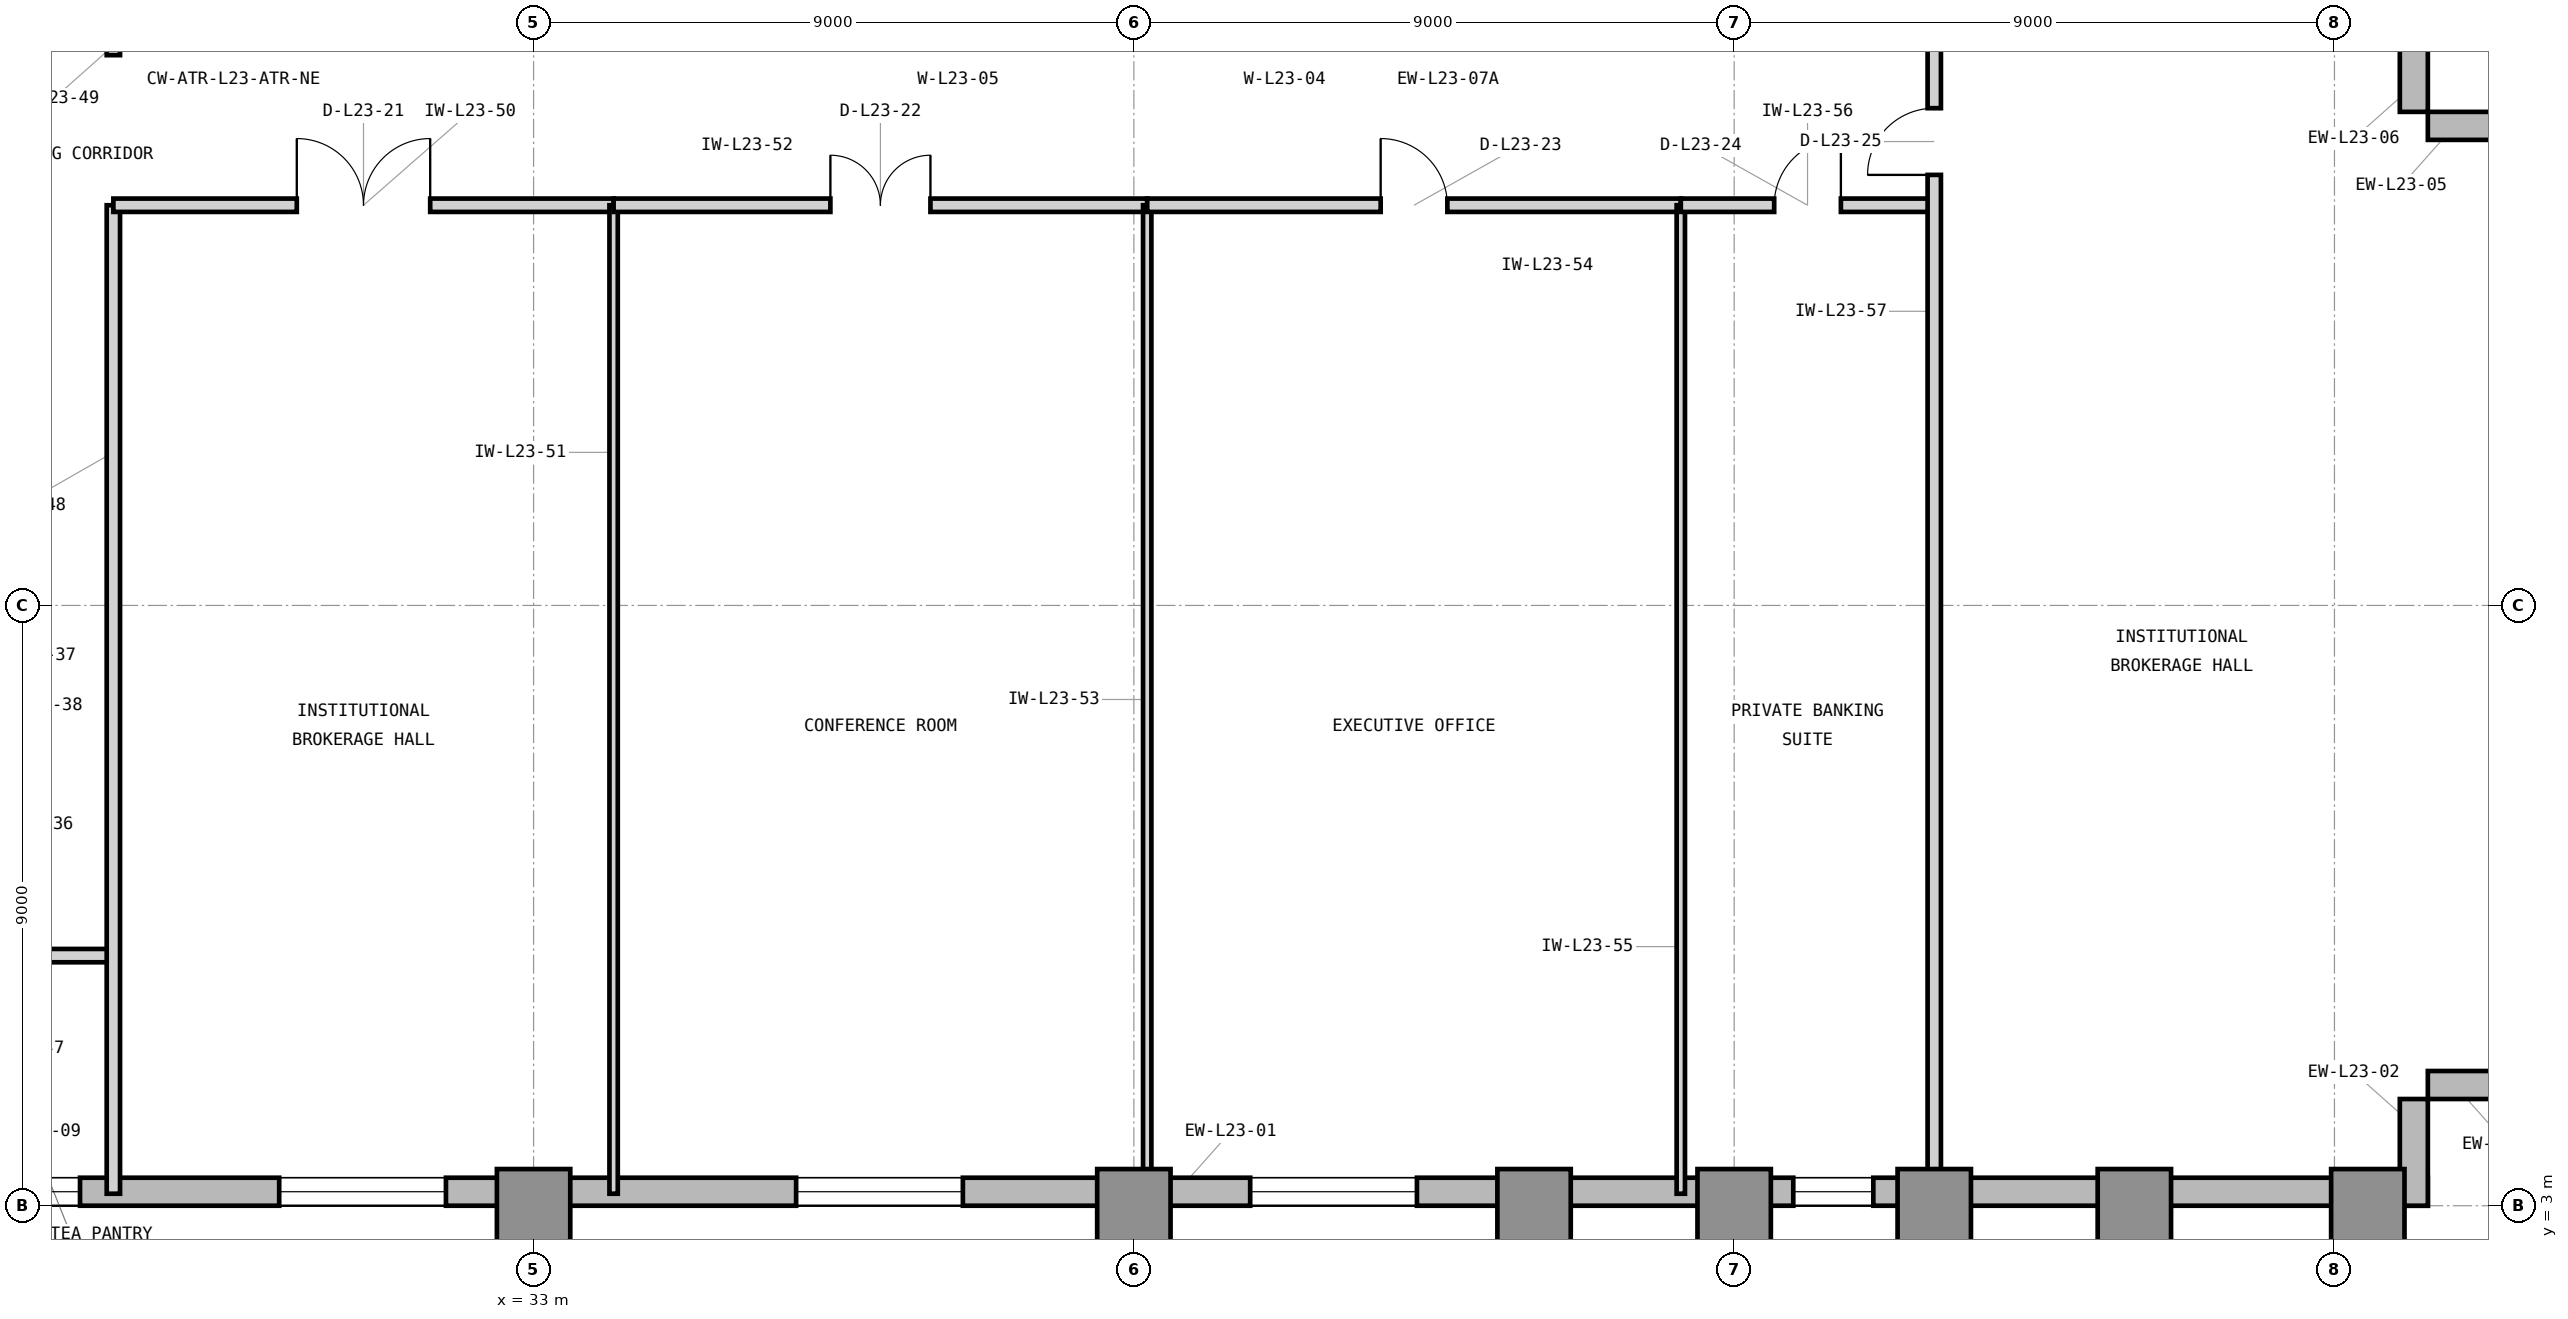
"""IFC4 building model, lengths in metres.
Left out: names, types, materials, properties, quantities, classifications, styles, units other than length and angle.
Written with IfcOpenShell. Run it as: python <this file> out.ifc"""

import sys

from ifc_helpers import new_model, si_unit, direction, frame, frame_2d, origin, origin_2d, place, context, subcontext, project, spatial, rectangle, extrude, element, fill, save


model = new_model("IFC4")
c1 = context("Model", 3, precision=1e-05, world=origin(), true_north=direction((0.0, 1.0)))
c2 = subcontext(c1, "Body", "Model", "MODEL_VIEW")
j1 = project(units=[si_unit("LENGTHUNIT", "METRE"), si_unit("PLANEANGLEUNIT", "RADIAN")], contexts=[c1])
p1 = place(None, origin())
s1 = spatial("IfcSite", under=j1, at=p1, CompositionType="ELEMENT")
p2 = place(p1, origin())
s2 = spatial("IfcBuilding", under=s1, at=p2, CompositionType="ELEMENT")
p3 = place(p2, frame((0.0, 0.0, 101.1)))
s3 = spatial("IfcBuildingStorey", under=s2, at=p3, CompositionType="ELEMENT", Elevation=101.1)
for number, where, z_axis, x_axis in (
    (1, (33.0, 3.0, 0.0), (0.0, 0.0, 1.0), (1.0, 0.0, 0.0)),
    (2, (42.0, 3.0, 0.0), (0.0, 0.0, 1.0), (1.0, 0.0, 0.0)),
    (3, (48.0, 3.0, 0.0), (0.0, 0.0, 1.0), (1.0, 0.0, 0.0)),
    (4, (51.0, 3.0, 0.0), (0.0, 0.0, 1.0), (1.0, 0.0, 0.0)),
    (5, (54.0, 3.0, 0.0), (0.0, 0.0, 1.0), (1.0, 0.0, 0.0)),
    (6, (57.0, 3.0, 0.0), (0.0, 0.0, 1.0), (1.0, 0.0, 0.0)),
    (7, (60.5, 3.0, 0.0), (0.0, 0.0, 1.0), (1.0, 0.0, 0.0)),
):
    element("IfcColumn", number, at=place(p3, frame(where, z_axis=z_axis, x_axis=x_axis)), inside=s3, PredefinedType="COLUMN", context=c2, shape_type="SweptSolid", body=[
        extrude(rectangle(XDim=1.1, YDim=1.1, at=origin_2d()), origin(), (0.0, 0.0, 1.0), 3.9),
    ])
p4 = place(p3, frame((23.9, 3.21, 0.0), z_axis=(0.0, 0.0, 1.0), x_axis=(1.0, 0.0, 0.0)))
e8 = element("IfcWall", 8, at=p4, inside=s3, PredefinedType="STANDARD", context=c2, shape_type="SweptSolid", body=[
    extrude(rectangle(XDim=37.5, YDim=0.42, at=frame_2d((18.75, 0.0))), origin(), (0.0, 0.0, 1.0), 3.7),
])
p5 = place(p4, frame((19.844, 0.0, 0.85)))
e9 = element("IfcOpeningElement", 9, at=p5, cuts=e8, PredefinedType="OPENING", context=c2, shape_type="SweptSolid", body=[
    extrude(rectangle(XDim=2.5, YDim=2.25, at=frame_2d((1.25, 1.125))), frame((0.0, 0.22, 0.0), z_axis=(0.0, -1.0, 0.0), x_axis=(1.0, 0.0, 0.0)), (0.0, 0.0, 1.0), 0.44),
])
p6 = place(p4, frame((1.1, 0.0, 0.85)))
e10 = element("IfcOpeningElement", 10, at=p6, cuts=e8, PredefinedType="OPENING", context=c2, shape_type="SweptSolid", body=[
    extrude(rectangle(XDim=1.2, YDim=2.25, at=frame_2d((0.6, 1.125))), frame((0.0, 0.22, 0.0), z_axis=(0.0, -1.0, 0.0), x_axis=(1.0, 0.0, 0.0)), (0.0, 0.0, 1.0), 0.44),
])
p7 = place(p4, frame((5.286, 0.0, 0.85)))
e11 = element("IfcOpeningElement", 11, at=p7, cuts=e8, PredefinedType="OPENING", context=c2, shape_type="SweptSolid", body=[
    extrude(rectangle(XDim=2.5, YDim=2.25, at=frame_2d((1.25, 1.125))), frame((0.0, 0.22, 0.0), z_axis=(0.0, -1.0, 0.0), x_axis=(1.0, 0.0, 0.0)), (0.0, 0.0, 1.0), 0.44),
])
p8 = place(p4, frame((13.036, 0.0, 0.85)))
e12 = element("IfcOpeningElement", 12, at=p8, cuts=e8, PredefinedType="OPENING", context=c2, shape_type="SweptSolid", body=[
    extrude(rectangle(XDim=2.5, YDim=2.25, at=frame_2d((1.25, 1.125))), frame((0.0, 0.22, 0.0), z_axis=(0.0, -1.0, 0.0), x_axis=(1.0, 0.0, 0.0)), (0.0, 0.0, 1.0), 0.44),
])
p9 = place(p4, frame((27.986, 0.0, 0.85)))
e13 = element("IfcOpeningElement", 13, at=p9, cuts=e8, PredefinedType="OPENING", context=c2, shape_type="SweptSolid", body=[
    extrude(rectangle(XDim=1.2, YDim=2.25, at=frame_2d((0.6, 1.125))), frame((0.0, 0.22, 0.0), z_axis=(0.0, -1.0, 0.0), x_axis=(1.0, 0.0, 0.0)), (0.0, 0.0, 1.0), 0.44),
])
for number, where, z_axis, x_axis in (
    (14, (61.19, 3.0, 0.0), (0.0, 0.0, 1.0), (0.0, 1.0, 0.0)),
    (15, (61.4, 4.81, 0.0), (0.0, 0.0, 1.0), (1.0, 0.0, 0.0)),
    (16, (63.0, 19.19, 0.0), (0.0, 0.0, 1.0), (-1.0, 0.0, 0.0)),
    (17, (61.19, 19.4, 0.0), (0.0, 0.0, 1.0), (0.0, 1.0, 0.0)),
):
    element("IfcWall", number, at=place(p3, frame(where, z_axis=z_axis, x_axis=x_axis)), inside=s3, PredefinedType="STANDARD", context=c2, shape_type="SweptSolid", body=[
        extrude(rectangle(XDim=1.6, YDim=0.42, at=frame_2d((0.8, 0.0))), origin(), (0.0, 0.0, 1.0), 3.7),
    ])
p10 = place(p3, frame((23.85, 6.75, 0.0), z_axis=(0.0, 0.0, 1.0), x_axis=(1.0, 0.0, 0.0)))
e18 = element("IfcWall", 18, at=p10, inside=s3, PredefinedType="PARTITIONING", context=c2, shape_type="SweptSolid", body=[
    extrude(rectangle(XDim=2.85, YDim=0.2, at=frame_2d((1.425, 0.0))), origin(), (0.0, 0.0, 1.0), 3.69),
])
p11 = place(p10, frame((0.7, 0.0, 0.0)))
e19 = element("IfcOpeningElement", 19, at=p11, cuts=e18, PredefinedType="OPENING", context=c2, shape_type="SweptSolid", body=[
    extrude(rectangle(XDim=1.0, YDim=2.15, at=frame_2d((0.5, 1.075))), frame((0.0, 0.11, 0.0), z_axis=(0.0, -1.0, 0.0), x_axis=(1.0, 0.0, 0.0)), (0.0, 0.0, 1.0), 0.22),
])
p12 = place(p3, frame((26.7, 3.18, 0.0), z_axis=(0.0, 0.0, 1.0), x_axis=(0.0, 1.0, 0.0)))
e20 = element("IfcWall", 20, at=p12, inside=s3, PredefinedType="PARTITIONING", context=c2, shape_type="SweptSolid", body=[
    extrude(rectangle(XDim=14.82, YDim=0.2, at=frame_2d((7.41, 0.0))), origin(), (0.0, 0.0, 1.0), 3.69),
])
p13 = place(p3, frame((26.7, 20.25, 0.0), z_axis=(0.0, 0.0, 1.0), x_axis=(0.0, 1.0, 0.0)))
e21 = element("IfcWall", 21, at=p13, inside=s3, PredefinedType="PARTITIONING", context=c2, shape_type="SweptSolid", body=[
    extrude(rectangle(XDim=0.57, YDim=0.2, at=frame_2d((0.285, 0.0))), origin(), (0.0, 0.0, 1.0), 3.69),
])
p14 = place(p3, frame((26.7, 18.0, 0.0), z_axis=(0.0, 0.0, 1.0), x_axis=(1.0, 0.0, 0.0)))
e22 = element("IfcWall", 22, at=p14, inside=s3, PredefinedType="PARTITIONING", context=c2, shape_type="SweptSolid", body=[
    extrude(rectangle(XDim=7.5, YDim=0.2, at=frame_2d((3.75, 0.0))), origin(), (0.0, 0.0, 1.0), 3.227),
])
p15 = place(p14, frame((2.75, 0.0, 0.0)))
e23 = element("IfcOpeningElement", 23, at=p15, cuts=e22, PredefinedType="OPENING", context=c2, shape_type="SweptSolid", body=[
    extrude(rectangle(XDim=2.0, YDim=2.5, at=frame_2d((1.0, 1.25))), frame((0.0, 0.11, 0.0), z_axis=(0.0, -1.0, 0.0), x_axis=(1.0, 0.0, 0.0)), (0.0, 0.0, 1.0), 0.22),
])
p16 = place(p3, frame((34.2, 3.18, 0.0), z_axis=(0.0, 0.0, 1.0), x_axis=(0.0, 1.0, 0.0)))
e24 = element("IfcWall", 24, at=p16, inside=s3, PredefinedType="PARTITIONING", context=c2, shape_type="SweptSolid", body=[
    extrude(rectangle(XDim=14.82, YDim=0.125, at=frame_2d((7.41, 0.0))), origin(), (0.0, 0.0, 1.0), 3.69),
])
p17 = place(p3, frame((34.2, 18.0, 0.0), z_axis=(0.0, 0.0, 1.0), x_axis=(1.0, 0.0, 0.0)))
e25 = element("IfcWall", 25, at=p17, inside=s3, PredefinedType="PARTITIONING", context=c2, shape_type="SweptSolid", body=[
    extrude(rectangle(XDim=8.0, YDim=0.2, at=frame_2d((4.0, 0.0))), origin(), (0.0, 0.0, 1.0), 3.227),
])
p18 = place(p17, frame((3.25, 0.0, 0.0)))
e26 = element("IfcOpeningElement", 26, at=p18, cuts=e25, PredefinedType="OPENING", context=c2, shape_type="SweptSolid", body=[
    extrude(rectangle(XDim=1.5, YDim=2.3, at=frame_2d((0.75, 1.15))), frame((0.0, 0.11, 0.0), z_axis=(0.0, -1.0, 0.0), x_axis=(1.0, 0.0, 0.0)), (0.0, 0.0, 1.0), 0.22),
])
p19 = place(p3, frame((42.2, 3.18, 0.0), z_axis=(0.0, 0.0, 1.0), x_axis=(0.0, 1.0, 0.0)))
e27 = element("IfcWall", 27, at=p19, inside=s3, PredefinedType="PARTITIONING", context=c2, shape_type="SweptSolid", body=[
    extrude(rectangle(XDim=14.82, YDim=0.125, at=frame_2d((7.41, 0.0))), origin(), (0.0, 0.0, 1.0), 3.69),
])
p20 = place(p3, frame((42.2, 18.0, 0.0), z_axis=(0.0, 0.0, 1.0), x_axis=(1.0, 0.0, 0.0)))
e28 = element("IfcWall", 28, at=p20, inside=s3, PredefinedType="PARTITIONING", context=c2, shape_type="SweptSolid", body=[
    extrude(rectangle(XDim=8.0, YDim=0.2, at=frame_2d((4.0, 0.0))), origin(), (0.0, 0.0, 1.0), 3.227),
])
p21 = place(p20, frame((3.5, 0.0, 0.0)))
e29 = element("IfcOpeningElement", 29, at=p21, cuts=e28, PredefinedType="OPENING", context=c2, shape_type="SweptSolid", body=[
    extrude(rectangle(XDim=1.0, YDim=2.15, at=frame_2d((0.5, 1.075))), frame((0.0, 0.11, 0.0), z_axis=(0.0, -1.0, 0.0), x_axis=(1.0, 0.0, 0.0)), (0.0, 0.0, 1.0), 0.22),
])
p22 = place(p3, frame((50.2, 3.18, 0.0), z_axis=(0.0, 0.0, 1.0), x_axis=(0.0, 1.0, 0.0)))
e30 = element("IfcWall", 30, at=p22, inside=s3, PredefinedType="PARTITIONING", context=c2, shape_type="SweptSolid", body=[
    extrude(rectangle(XDim=14.82, YDim=0.125, at=frame_2d((7.41, 0.0))), origin(), (0.0, 0.0, 1.0), 3.69),
])
p23 = place(p3, frame((50.2, 18.0, 0.0), z_axis=(0.0, 0.0, 1.0), x_axis=(1.0, 0.0, 0.0)))
e31 = element("IfcWall", 31, at=p23, inside=s3, PredefinedType="PARTITIONING", context=c2, shape_type="SweptSolid", body=[
    extrude(rectangle(XDim=3.8, YDim=0.2, at=frame_2d((1.9, 0.0))), origin(), (0.0, 0.0, 1.0), 3.227),
])
p24 = place(p23, frame((1.4, 0.0, 0.0)))
e32 = element("IfcOpeningElement", 32, at=p24, cuts=e31, PredefinedType="OPENING", context=c2, shape_type="SweptSolid", body=[
    extrude(rectangle(XDim=1.0, YDim=2.15, at=frame_2d((0.5, 1.075))), frame((0.0, 0.11, 0.0), z_axis=(0.0, -1.0, 0.0), x_axis=(1.0, 0.0, 0.0)), (0.0, 0.0, 1.0), 0.22),
])
p25 = place(p3, frame((54.0, 3.18, 0.0), z_axis=(0.0, 0.0, 1.0), x_axis=(0.0, 1.0, 0.0)))
e33 = element("IfcWall", 33, at=p25, inside=s3, PredefinedType="PARTITIONING", context=c2, shape_type="SweptSolid", body=[
    extrude(rectangle(XDim=17.64, YDim=0.2, at=frame_2d((8.82, 0.0))), origin(), (0.0, 0.0, 1.0), 2.917),
])
p26 = place(p25, frame((15.275, 0.0, 0.0)))
e34 = element("IfcOpeningElement", 34, at=p26, cuts=e33, PredefinedType="OPENING", context=c2, shape_type="SweptSolid", body=[
    extrude(rectangle(XDim=1.0, YDim=2.15, at=frame_2d((0.5, 1.075))), frame((0.0, 0.11, 0.0), z_axis=(0.0, -1.0, 0.0), x_axis=(1.0, 0.0, 0.0)), (0.0, 0.0, 1.0), 0.22),
])
p27 = place(p5, origin())
e35 = element("IfcWindow", 35, at=p27, inside=s3, PartitioningType="SINGLE_PANEL", PredefinedType="WINDOW", context=c2, shape_type="SweptSolid", body=[
    extrude(rectangle(XDim=2.5, YDim=2.25, at=frame_2d((1.25, 1.125))), frame((0.0, 0.11, 0.0), z_axis=(0.0, -1.0, 0.0), x_axis=(1.0, 0.0, 0.0)), (0.0, 0.0, 1.0), 0.06),
])
fill(e9, e35)
p28 = place(p15, origin())
e36 = element("IfcDoor", 36, at=p28, inside=s3, OperationType="DOUBLE_DOOR_SINGLE_SWING", PredefinedType="DOOR", context=c2, shape_type="SweptSolid", body=[
    extrude(rectangle(XDim=2.0, YDim=2.5, at=frame_2d((1.0, 1.25))), frame((0.0, 0.025, 0.0), z_axis=(0.0, -1.0, 0.0), x_axis=(1.0, 0.0, 0.0)), (0.0, 0.0, 1.0), 0.05),
])
fill(e23, e36)
p29 = place(p18, origin())
e37 = element("IfcDoor", 37, at=p29, inside=s3, OperationType="DOUBLE_DOOR_SINGLE_SWING", PredefinedType="DOOR", context=c2, shape_type="SweptSolid", body=[
    extrude(rectangle(XDim=1.5, YDim=2.3, at=frame_2d((0.75, 1.15))), frame((0.0, 0.025, 0.0), z_axis=(0.0, -1.0, 0.0), x_axis=(1.0, 0.0, 0.0)), (0.0, 0.0, 1.0), 0.05),
])
fill(e26, e37)
p30 = place(p21, origin())
e38 = element("IfcDoor", 38, at=p30, inside=s3, OperationType="SINGLE_SWING_LEFT", PredefinedType="DOOR", context=c2, shape_type="SweptSolid", body=[
    extrude(rectangle(XDim=1.0, YDim=2.15, at=frame_2d((0.5, 1.075))), frame((0.0, 0.025, 0.0), z_axis=(0.0, -1.0, 0.0), x_axis=(1.0, 0.0, 0.0)), (0.0, 0.0, 1.0), 0.05),
])
fill(e29, e38)
p31 = place(p24, origin())
e39 = element("IfcDoor", 39, at=p31, inside=s3, OperationType="SINGLE_SWING_RIGHT", PredefinedType="DOOR", context=c2, shape_type="SweptSolid", body=[
    extrude(rectangle(XDim=1.0, YDim=2.15, at=frame_2d((0.5, 1.075))), frame((0.0, 0.025, 0.0), z_axis=(0.0, -1.0, 0.0), x_axis=(1.0, 0.0, 0.0)), (0.0, 0.0, 1.0), 0.05),
])
fill(e32, e39)
p32 = place(p26, origin())
e40 = element("IfcDoor", 40, at=p32, inside=s3, OperationType="SINGLE_SWING_LEFT", PredefinedType="DOOR", context=c2, shape_type="SweptSolid", body=[
    extrude(rectangle(XDim=1.0, YDim=2.15, at=frame_2d((0.5, 1.075))), frame((0.0, 0.025, 0.0), z_axis=(0.0, -1.0, 0.0), x_axis=(1.0, 0.0, 0.0)), (0.0, 0.0, 1.0), 0.05),
])
fill(e34, e40)
p33 = place(p6, origin())
e41 = element("IfcWindow", 41, at=p33, inside=s3, PartitioningType="SINGLE_PANEL", PredefinedType="WINDOW", context=c2, shape_type="SweptSolid", body=[
    extrude(rectangle(XDim=1.2, YDim=2.25, at=frame_2d((0.6, 1.125))), frame((0.0, 0.11, 0.0), z_axis=(0.0, -1.0, 0.0), x_axis=(1.0, 0.0, 0.0)), (0.0, 0.0, 1.0), 0.06),
])
fill(e10, e41)
p34 = place(p7, origin())
e42 = element("IfcWindow", 42, at=p34, inside=s3, PartitioningType="SINGLE_PANEL", PredefinedType="WINDOW", context=c2, shape_type="SweptSolid", body=[
    extrude(rectangle(XDim=2.5, YDim=2.25, at=frame_2d((1.25, 1.125))), frame((0.0, 0.11, 0.0), z_axis=(0.0, -1.0, 0.0), x_axis=(1.0, 0.0, 0.0)), (0.0, 0.0, 1.0), 0.06),
])
fill(e11, e42)
p35 = place(p8, origin())
e43 = element("IfcWindow", 43, at=p35, inside=s3, PartitioningType="SINGLE_PANEL", PredefinedType="WINDOW", context=c2, shape_type="SweptSolid", body=[
    extrude(rectangle(XDim=2.5, YDim=2.25, at=frame_2d((1.25, 1.125))), frame((0.0, 0.11, 0.0), z_axis=(0.0, -1.0, 0.0), x_axis=(1.0, 0.0, 0.0)), (0.0, 0.0, 1.0), 0.06),
])
fill(e12, e43)
p36 = place(p9, origin())
e44 = element("IfcWindow", 44, at=p36, inside=s3, PartitioningType="SINGLE_PANEL", PredefinedType="WINDOW", context=c2, shape_type="SweptSolid", body=[
    extrude(rectangle(XDim=1.2, YDim=2.25, at=frame_2d((0.6, 1.125))), frame((0.0, 0.11, 0.0), z_axis=(0.0, -1.0, 0.0), x_axis=(1.0, 0.0, 0.0)), (0.0, 0.0, 1.0), 0.06),
])
fill(e13, e44)
save(model, sys.argv[1])
